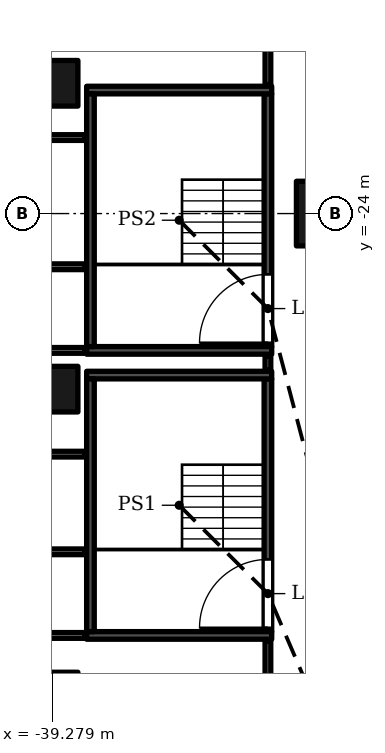
"""IFC4 building model, lengths in metres.
Left out: names, types, materials, properties, quantities, classifications, styles, units other than length and angle.
Written with IfcOpenShell. Run it as: python <this file> out.ifc"""

import sys

from ifc_helpers import new_model, si_unit, direction, frame, frame_2d, origin, origin_2d, place, context, subcontext, project, spatial, rectangle, extrude, element, fill, save


model = new_model("IFC4")
c1 = context("Model", 3, precision=1e-05, world=origin(), true_north=direction((0.0, 1.0)))
c2 = subcontext(c1, "Body", "Model", "MODEL_VIEW")
j1 = project(units=[si_unit("LENGTHUNIT", "METRE"), si_unit("PLANEANGLEUNIT", "RADIAN")], contexts=[c1])
p1 = place(None, origin())
s1 = spatial("IfcSite", under=j1, at=p1, CompositionType="ELEMENT")
p2 = place(p1, origin())
s2 = spatial("IfcBuilding", under=s1, at=p2, CompositionType="ELEMENT")
p3 = place(p2, origin())
s3 = spatial("IfcBuildingStorey", under=s2, at=p3, CompositionType="ELEMENT", Elevation=0.0)
p4 = place(p3, frame((-32.0, -24.0, 0.0), z_axis=(0.0, 0.0, 1.0), x_axis=(1.0, 0.0, 0.0)))
e1 = element("IfcColumn", 1, at=p4, inside=s3, PredefinedType="COLUMN", context=c2, shape_type="SweptSolid", body=[
    extrude(rectangle(XDim=1.7, YDim=1.7, at=origin_2d()), origin(), (0.0, 0.0, 1.0), 9.0),
])
for number, where, z_axis, x_axis in (
    (2, (-39.2, -36.669, 0.0), (0.0, 0.0, 1.0), (1.0, 0.0, 0.0)),
    (3, (-39.2, -28.62, 0.0), (0.0, 0.0, 1.0), (1.0, 0.0, 0.0)),
    (4, (-39.2, -20.572, 0.0), (0.0, 0.0, 1.0), (1.0, 0.0, 0.0)),
):
    element("IfcColumn", number, at=place(p3, frame(where, z_axis=z_axis, x_axis=x_axis)), inside=s3, PredefinedType="COLUMN", context=c2, shape_type="SweptSolid", body=[
        extrude(rectangle(XDim=1.2, YDim=1.2, at=origin_2d()), origin(), (0.0, 0.0, 1.0), 9.0),
    ])
for number, where, z_axis, x_axis in (
    (5, (-38.37, -35.1, 0.0), (0.0, 0.0, 1.0), (1.0, 0.0, 0.0)),
    (6, (-38.37, -28.25, 0.0), (0.0, 0.0, 1.0), (1.0, 0.0, 0.0)),
):
    element("IfcWall", number, at=place(p3, frame(where, z_axis=z_axis, x_axis=x_axis)), inside=s3, PredefinedType="SOLIDWALL", context=c2, shape_type="SweptSolid", body=[
        extrude(rectangle(XDim=4.87, YDim=0.2, at=frame_2d((2.435, 0.0))), origin(), (0.0, 0.0, 1.0), 8.5),
    ])
p5 = place(p3, frame((-38.27, -35.0, 0.0), z_axis=(0.0, 0.0, 1.0), x_axis=(0.0, 1.0, 0.0)))
e7 = element("IfcWall", 7, at=p5, inside=s3, PredefinedType="SOLIDWALL", context=c2, shape_type="SweptSolid", body=[
    extrude(rectangle(XDim=6.65, YDim=0.2, at=frame_2d((3.325, 0.0))), origin(), (0.0, 0.0, 1.0), 8.5),
])
p6 = place(p5, frame((0.1, 0.0, 0.0)))
e8 = element("IfcOpeningElement", 8, at=p6, cuts=e7, PredefinedType="OPENING", context=c2, shape_type="SweptSolid", body=[
    extrude(rectangle(XDim=1.8, YDim=2.4, at=frame_2d((0.9, 1.2))), frame((0.0, 0.11, 0.0), z_axis=(0.0, -1.0, 0.0), x_axis=(1.0, 0.0, 0.0)), (0.0, 0.0, 1.0), 0.22),
])
p7 = place(p3, frame((-33.6, -35.0, 0.0), z_axis=(0.0, 0.0, 1.0), x_axis=(0.0, 1.0, 0.0)))
e9 = element("IfcWall", 9, at=p7, inside=s3, PredefinedType="SOLIDWALL", context=c2, shape_type="SweptSolid", body=[
    extrude(rectangle(XDim=6.65, YDim=0.2, at=frame_2d((3.325, 0.0))), origin(), (0.0, 0.0, 1.0), 8.5),
])
p8 = place(p7, frame((0.1, 0.0, 0.0)))
e10 = element("IfcOpeningElement", 10, at=p8, cuts=e9, PredefinedType="OPENING", context=c2, shape_type="SweptSolid", body=[
    extrude(rectangle(XDim=1.8, YDim=2.4, at=frame_2d((0.9, 1.2))), frame((0.0, 0.11, 0.0), z_axis=(0.0, -1.0, 0.0), x_axis=(1.0, 0.0, 0.0)), (0.0, 0.0, 1.0), 0.22),
])
for number, where, z_axis, x_axis in (
    (11, (-38.37, -27.6, 0.0), (0.0, 0.0, 1.0), (1.0, 0.0, 0.0)),
    (12, (-38.37, -20.75, 0.0), (0.0, 0.0, 1.0), (1.0, 0.0, 0.0)),
):
    element("IfcWall", number, at=place(p3, frame(where, z_axis=z_axis, x_axis=x_axis)), inside=s3, PredefinedType="SOLIDWALL", context=c2, shape_type="SweptSolid", body=[
        extrude(rectangle(XDim=4.87, YDim=0.2, at=frame_2d((2.435, 0.0))), origin(), (0.0, 0.0, 1.0), 8.5),
    ])
p9 = place(p3, frame((-38.27, -27.5, 0.0), z_axis=(0.0, 0.0, 1.0), x_axis=(0.0, 1.0, 0.0)))
e13 = element("IfcWall", 13, at=p9, inside=s3, PredefinedType="SOLIDWALL", context=c2, shape_type="SweptSolid", body=[
    extrude(rectangle(XDim=6.65, YDim=0.2, at=frame_2d((3.325, 0.0))), origin(), (0.0, 0.0, 1.0), 8.5),
])
p10 = place(p9, frame((0.1, 0.0, 0.0)))
e14 = element("IfcOpeningElement", 14, at=p10, cuts=e13, PredefinedType="OPENING", context=c2, shape_type="SweptSolid", body=[
    extrude(rectangle(XDim=1.8, YDim=2.4, at=frame_2d((0.9, 1.2))), frame((0.0, 0.11, 0.0), z_axis=(0.0, -1.0, 0.0), x_axis=(1.0, 0.0, 0.0)), (0.0, 0.0, 1.0), 0.22),
])
p11 = place(p3, frame((-33.6, -27.5, 0.0), z_axis=(0.0, 0.0, 1.0), x_axis=(0.0, 1.0, 0.0)))
e15 = element("IfcWall", 15, at=p11, inside=s3, PredefinedType="SOLIDWALL", context=c2, shape_type="SweptSolid", body=[
    extrude(rectangle(XDim=6.65, YDim=0.2, at=frame_2d((3.325, 0.0))), origin(), (0.0, 0.0, 1.0), 8.5),
])
p12 = place(p11, frame((0.1, 0.0, 0.0)))
e16 = element("IfcOpeningElement", 16, at=p12, cuts=e15, PredefinedType="OPENING", context=c2, shape_type="SweptSolid", body=[
    extrude(rectangle(XDim=1.8, YDim=2.4, at=frame_2d((0.9, 1.2))), frame((0.0, 0.11, 0.0), z_axis=(0.0, -1.0, 0.0), x_axis=(1.0, 0.0, 0.0)), (0.0, 0.0, 1.0), 0.22),
])
p13 = place(p3, frame((-33.6, -44.6, 0.0), z_axis=(0.0, 0.0, 1.0), x_axis=(0.0, 1.0, 0.0)))
e17 = element("IfcWall", 17, at=p13, inside=s3, PredefinedType="PARTITIONING", context=c2, shape_type="SweptSolid", body=[
    extrude(rectangle(XDim=9.36, YDim=0.15, at=frame_2d((4.68, 0.0))), origin(), (0.0, 0.0, 1.0), 7.3),
])
p14 = place(p13, frame((6.7, 0.0, 0.0)))
e18 = element("IfcOpeningElement", 18, at=p14, cuts=e17, PredefinedType="OPENING", context=c2, shape_type="SweptSolid", body=[
    extrude(rectangle(XDim=1.2, YDim=2.1, at=frame_2d((0.6, 1.05))), frame((0.0, 0.085, 0.0), z_axis=(0.0, -1.0, 0.0), x_axis=(1.0, 0.0, 0.0)), (0.0, 0.0, 1.0), 0.17),
])
p15 = place(p3, frame((-49.72, -35.101, 0.0), z_axis=(0.0, 0.0, 1.0), x_axis=(1.0, 0.0, 0.0)))
e19 = element("IfcWall", 19, at=p15, inside=s3, PredefinedType="PARTITIONING", context=c2, shape_type="SweptSolid", body=[
    extrude(rectangle(XDim=11.31, YDim=0.151, at=frame_2d((5.655, 0.0))), origin(), (0.0, 0.0, 1.0), 7.6),
])
p16 = place(p15, frame((5.155, 0.0, 0.0)))
e20 = element("IfcOpeningElement", 20, at=p16, cuts=e19, PredefinedType="OPENING", context=c2, shape_type="SweptSolid", body=[
    extrude(rectangle(XDim=1.2, YDim=2.1, at=frame_2d((0.6, 1.05))), frame((0.0, 0.085, 0.0), z_axis=(0.0, -1.0, 0.0), x_axis=(1.0, 0.0, 0.0)), (0.0, 0.0, 1.0), 0.171),
])
p17 = place(p3, frame((-49.72, -32.9, 0.0), z_axis=(0.0, 0.0, 1.0), x_axis=(1.0, 0.0, 0.0)))
e21 = element("IfcWall", 21, at=p17, inside=s3, PredefinedType="PARTITIONING", context=c2, shape_type="SweptSolid", body=[
    extrude(rectangle(XDim=11.31, YDim=0.15, at=frame_2d((5.655, 0.0))), origin(), (0.0, 0.0, 1.0), 7.6),
])
p18 = place(p3, frame((-40.6, -30.33, 0.0), z_axis=(0.0, 0.0, 1.0), x_axis=(1.0, 0.0, 0.0)))
e22 = element("IfcWall", 22, at=p18, inside=s3, PredefinedType="PARTITIONING", context=c2, shape_type="SweptSolid", body=[
    extrude(rectangle(XDim=2.19, YDim=0.15, at=frame_2d((1.095, 0.0))), origin(), (0.0, 0.0, 1.0), 8.5),
])
p19 = place(p3, frame((-33.6, -28.11, 0.0), z_axis=(0.0, 0.0, 1.0), x_axis=(0.0, 1.0, 0.0)))
e23 = element("IfcWall", 23, at=p19, inside=s3, PredefinedType="PARTITIONING", context=c2, shape_type="SweptSolid", body=[
    extrude(rectangle(XDim=0.37, YDim=0.15, at=frame_2d((0.185, 0.0))), origin(), (0.0, 0.0, 1.0), 8.5),
])
p20 = place(p3, frame((-49.72, -27.601, 0.0), z_axis=(0.0, 0.0, 1.0), x_axis=(1.0, 0.0, 0.0)))
e24 = element("IfcWall", 24, at=p20, inside=s3, PredefinedType="PARTITIONING", context=c2, shape_type="SweptSolid", body=[
    extrude(rectangle(XDim=11.31, YDim=0.151, at=frame_2d((5.655, 0.0))), origin(), (0.0, 0.0, 1.0), 7.6),
])
p21 = place(p20, frame((5.155, 0.0, 0.0)))
e25 = element("IfcOpeningElement", 25, at=p21, cuts=e24, PredefinedType="OPENING", context=c2, shape_type="SweptSolid", body=[
    extrude(rectangle(XDim=1.2, YDim=2.1, at=frame_2d((0.6, 1.05))), frame((0.0, 0.085, 0.0), z_axis=(0.0, -1.0, 0.0), x_axis=(1.0, 0.0, 0.0)), (0.0, 0.0, 1.0), 0.171),
])
p22 = place(p3, frame((-49.72, -25.399, 0.0), z_axis=(0.0, 0.0, 1.0), x_axis=(1.0, 0.0, 0.0)))
e26 = element("IfcWall", 26, at=p22, inside=s3, PredefinedType="PARTITIONING", context=c2, shape_type="SweptSolid", body=[
    extrude(rectangle(XDim=11.31, YDim=0.151, at=frame_2d((5.655, 0.0))), origin(), (0.0, 0.0, 1.0), 7.6),
])
p23 = place(p22, frame((5.07, 0.0, 0.0)))
e27 = element("IfcOpeningElement", 27, at=p23, cuts=e26, PredefinedType="OPENING", context=c2, shape_type="SweptSolid", body=[
    extrude(rectangle(XDim=1.2, YDim=2.1, at=frame_2d((0.6, 1.05))), frame((0.0, 0.085, 0.0), z_axis=(0.0, -1.0, 0.0), x_axis=(1.0, 0.0, 0.0)), (0.0, 0.0, 1.0), 0.171),
])
p24 = place(p3, frame((-40.6, -22.0, 0.0), z_axis=(0.0, 0.0, 1.0), x_axis=(1.0, 0.0, 0.0)))
e28 = element("IfcWall", 28, at=p24, inside=s3, PredefinedType="PARTITIONING", context=c2, shape_type="SweptSolid", body=[
    extrude(rectangle(XDim=2.19, YDim=0.15, at=frame_2d((1.095, 0.0))), origin(), (0.0, 0.0, 1.0), 8.5),
])
p25 = place(p3, frame((-33.6, -20.61, 0.0), z_axis=(0.0, 0.0, 1.0), x_axis=(0.0, 1.0, 0.0)))
e29 = element("IfcWall", 29, at=p25, inside=s3, PredefinedType="PARTITIONING", context=c2, shape_type="SweptSolid", body=[
    extrude(rectangle(XDim=8.97, YDim=0.15, at=frame_2d((4.485, 0.0))), origin(), (0.0, 0.0, 1.0), 8.5),
])
p26 = place(p25, frame((2.711, 0.0, 0.0)))
e30 = element("IfcOpeningElement", 30, at=p26, cuts=e29, PredefinedType="OPENING", context=c2, shape_type="SweptSolid", body=[
    extrude(rectangle(XDim=1.2, YDim=2.1, at=frame_2d((0.6, 1.05))), frame((0.0, 0.085, 0.0), z_axis=(0.0, -1.0, 0.0), x_axis=(1.0, 0.0, 0.0)), (0.0, 0.0, 1.0), 0.17),
])
p27 = place(p8, origin())
e31 = element("IfcDoor", 31, at=p27, inside=s3, OperationType="DOUBLE_DOOR_SINGLE_SWING", PredefinedType="DOOR", context=c2, shape_type="SweptSolid", body=[
    extrude(rectangle(XDim=1.8, YDim=2.4, at=frame_2d((0.9, 1.2))), frame((0.0, 0.025, 0.0), z_axis=(0.0, -1.0, 0.0), x_axis=(1.0, 0.0, 0.0)), (0.0, 0.0, 1.0), 0.05),
])
fill(e10, e31)
p28 = place(p6, origin())
e32 = element("IfcDoor", 32, at=p28, inside=s3, OperationType="DOUBLE_DOOR_SINGLE_SWING", PredefinedType="DOOR", context=c2, shape_type="SweptSolid", body=[
    extrude(rectangle(XDim=1.8, YDim=2.4, at=frame_2d((0.9, 1.2))), frame((0.0, 0.025, 0.0), z_axis=(0.0, -1.0, 0.0), x_axis=(1.0, 0.0, 0.0)), (0.0, 0.0, 1.0), 0.05),
])
fill(e8, e32)
p29 = place(p12, origin())
e33 = element("IfcDoor", 33, at=p29, inside=s3, OperationType="DOUBLE_DOOR_SINGLE_SWING", PredefinedType="DOOR", context=c2, shape_type="SweptSolid", body=[
    extrude(rectangle(XDim=1.8, YDim=2.4, at=frame_2d((0.9, 1.2))), frame((0.0, 0.025, 0.0), z_axis=(0.0, -1.0, 0.0), x_axis=(1.0, 0.0, 0.0)), (0.0, 0.0, 1.0), 0.05),
])
fill(e16, e33)
p30 = place(p10, origin())
e34 = element("IfcDoor", 34, at=p30, inside=s3, OperationType="DOUBLE_DOOR_SINGLE_SWING", PredefinedType="DOOR", context=c2, shape_type="SweptSolid", body=[
    extrude(rectangle(XDim=1.8, YDim=2.4, at=frame_2d((0.9, 1.2))), frame((0.0, 0.025, 0.0), z_axis=(0.0, -1.0, 0.0), x_axis=(1.0, 0.0, 0.0)), (0.0, 0.0, 1.0), 0.05),
])
fill(e14, e34)
save(model, sys.argv[1])
